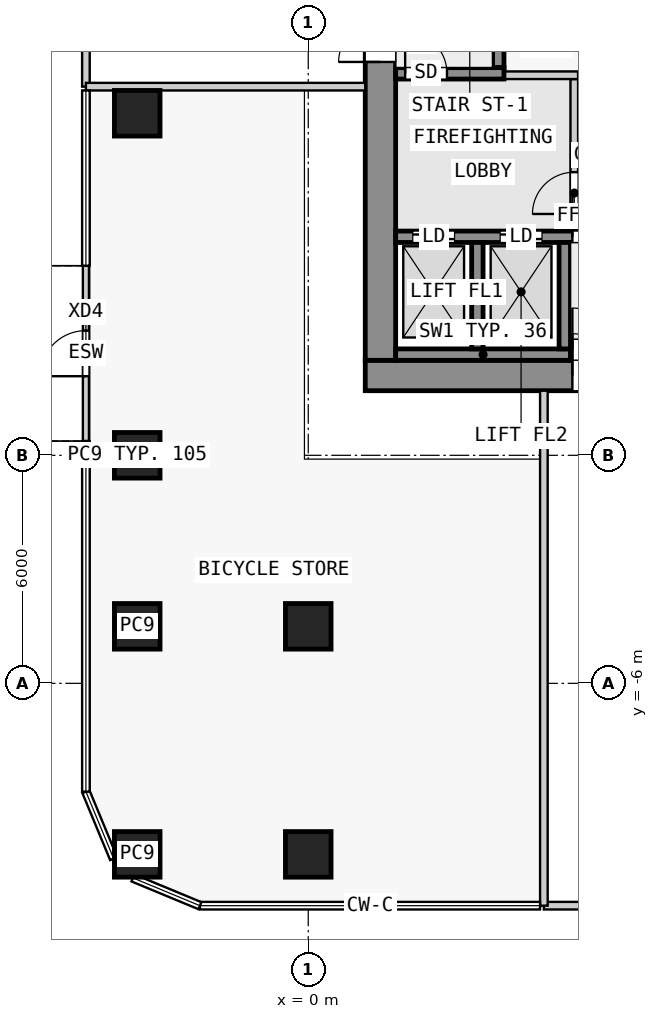
"""IFC4 building model, lengths in metres.
Left out: names, types, materials, properties, quantities, classifications, styles, units other than length and angle.
Written with IfcOpenShell. Run it as: python <this file> out.ifc"""

import sys

from ifc_helpers import new_model, si_unit, direction, frame, frame_2d, origin, origin_2d, place, context, subcontext, project, spatial, rectangle, extrude, element, fill, save


model = new_model("IFC4")
c1 = context("Model", 3, precision=1e-05, world=origin(), true_north=direction((0.0, 1.0)))
c2 = subcontext(c1, "Body", "Model", "MODEL_VIEW")
j1 = project(units=[si_unit("LENGTHUNIT", "METRE"), si_unit("PLANEANGLEUNIT", "RADIAN")], contexts=[c1])
p1 = place(None, origin())
s1 = spatial("IfcSite", under=j1, at=p1, CompositionType="ELEMENT")
p2 = place(p1, origin())
s2 = spatial("IfcBuilding", under=s1, at=p2, CompositionType="ELEMENT")
p3 = place(p2, origin())
s3 = spatial("IfcBuildingStorey", under=s2, at=p3, CompositionType="ELEMENT", Elevation=0.0)
for number, where, z_axis, x_axis in (
    (1, (-4.5, -10.5, 0.0), (0.0, 0.0, 1.0), (1.0, 0.0, 0.0)),
    (2, (-4.5, -4.5, 0.0), (0.0, 0.0, 1.0), (1.0, 0.0, 0.0)),
    (3, (-4.5, 0.0, 0.0), (0.0, 0.0, 1.0), (1.0, 0.0, 0.0)),
    (4, (-4.5, 9.0, 0.0), (0.0, 0.0, 1.0), (1.0, 0.0, 0.0)),
    (5, (0.0, -10.5, 0.0), (0.0, 0.0, 1.0), (1.0, 0.0, 0.0)),
    (6, (0.0, -4.5, 0.0), (0.0, 0.0, 1.0), (1.0, 0.0, 0.0)),
):
    element("IfcColumn", number, at=place(p3, frame(where, z_axis=z_axis, x_axis=x_axis)), inside=s3, PredefinedType="COLUMN", context=c2, shape_type="SweptSolid", body=[
        extrude(rectangle(XDim=1.2, YDim=1.2, at=origin_2d()), origin(), (0.0, 0.0, 1.0), 8.0),
    ])
p4 = place(p3, frame((1.5, 2.1, 0.0), z_axis=(0.0, 0.0, 1.0), x_axis=(1.0, 0.0, 0.0)))
e7 = element("IfcWall", 7, at=p4, inside=s3, PredefinedType="SHEAR", context=c2, shape_type="SweptSolid", body=[
    extrude(rectangle(XDim=21.0, YDim=0.8, at=frame_2d((10.5, 0.0))), origin(), (0.0, 0.0, 1.0), 7.65),
])
p5 = place(p4, frame((5.45, 0.0, 0.0)))
e8 = element("IfcOpeningElement", 8, at=p5, cuts=e7, PredefinedType="OPENING", context=c2, shape_type="SweptSolid", body=[
    extrude(rectangle(XDim=1.1, YDim=2.1, at=frame_2d((0.55, 1.05))), frame((0.0, 0.41, 0.0), z_axis=(0.0, -1.0, 0.0), x_axis=(1.0, 0.0, 0.0)), (0.0, 0.0, 1.0), 0.82),
])
p6 = place(p3, frame((1.9, 2.5, 0.0), z_axis=(0.0, 0.0, 1.0), x_axis=(0.0, 1.0, 0.0)))
e9 = element("IfcWall", 9, at=p6, inside=s3, PredefinedType="SHEAR", context=c2, shape_type="SweptSolid", body=[
    extrude(rectangle(XDim=14.7, YDim=0.8, at=frame_2d((7.35, 0.0))), origin(), (0.0, 0.0, 1.0), 7.65),
])
p7 = place(p6, frame((7.85, 0.0, 0.0)))
e10 = element("IfcOpeningElement", 10, at=p7, cuts=e9, PredefinedType="OPENING", context=c2, shape_type="SweptSolid", body=[
    extrude(rectangle(XDim=1.1, YDim=2.1, at=frame_2d((0.55, 1.05))), frame((0.0, 0.41, 0.0), z_axis=(0.0, -1.0, 0.0), x_axis=(1.0, 0.0, 0.0)), (0.0, 0.0, 1.0), 0.82),
])
p8 = place(p3, frame((2.3, 2.65, 0.0), z_axis=(0.0, 0.0, 1.0), x_axis=(1.0, 0.0, 0.0)))
e11 = element("IfcWall", 11, at=p8, inside=s3, PredefinedType="SHEAR", context=c2, shape_type="SweptSolid", body=[
    extrude(rectangle(XDim=4.6, YDim=0.3, at=frame_2d((2.3, 0.0))), origin(), (0.0, 0.0, 1.0), 7.65),
])
p9 = place(p3, frame((6.9, 2.775, 0.0), z_axis=(0.0, 0.0, 1.0), x_axis=(1.0, 0.0, 0.0)))
e12 = element("IfcWall", 12, at=p9, inside=s3, PredefinedType="SHEAR", context=c2, shape_type="SweptSolid", body=[
    extrude(rectangle(XDim=6.4, YDim=0.55, at=frame_2d((3.2, 0.0))), origin(), (0.0, 0.0, 1.0), 7.65),
])
p10 = place(p9, frame((0.05, 0.0, 0.0)))
e13 = element("IfcOpeningElement", 13, at=p10, cuts=e12, PredefinedType="OPENING", context=c2, shape_type="SweptSolid", body=[
    extrude(rectangle(XDim=1.1, YDim=2.1, at=frame_2d((0.55, 1.05))), frame((0.0, 0.285, 0.0), z_axis=(0.0, -1.0, 0.0), x_axis=(1.0, 0.0, 0.0)), (0.0, 0.0, 1.0), 0.57),
])
for number, where, z_axis, x_axis in (
    (14, (4.45, 2.8, 0.0), (0.0, 0.0, 1.0), (0.0, 1.0, 0.0)),
    (15, (6.75, 2.8, 0.0), (0.0, 0.0, 1.0), (0.0, 1.0, 0.0)),
):
    element("IfcWall", number, at=place(p3, frame(where, z_axis=z_axis, x_axis=x_axis)), inside=s3, PredefinedType="SHEAR", context=c2, shape_type="SweptSolid", body=[
        extrude(rectangle(XDim=2.8, YDim=0.3, at=frame_2d((1.4, 0.0))), origin(), (0.0, 0.0, 1.0), 7.65),
    ])
p11 = place(p3, frame((2.3, 5.75, 0.0), z_axis=(0.0, 0.0, 1.0), x_axis=(1.0, 0.0, 0.0)))
e16 = element("IfcWall", 16, at=p11, inside=s3, PredefinedType="SHEAR", context=c2, shape_type="SweptSolid", body=[
    extrude(rectangle(XDim=18.8, YDim=0.3, at=frame_2d((9.4, 0.0))), origin(), (0.0, 0.0, 1.0), 7.65),
])
p12 = place(p11, frame((4.65, 0.0, 0.0)))
e17 = element("IfcOpeningElement", 17, at=p12, cuts=e16, PredefinedType="OPENING", context=c2, shape_type="SweptSolid", body=[
    extrude(rectangle(XDim=1.1, YDim=2.1, at=frame_2d((0.55, 1.05))), frame((0.0, 0.16, 0.0), z_axis=(0.0, -1.0, 0.0), x_axis=(1.0, 0.0, 0.0)), (0.0, 0.0, 1.0), 0.32),
])
p13 = place(p11, frame((0.45, 0.0, 0.0)))
e18 = element("IfcOpeningElement", 18, at=p13, cuts=e16, PredefinedType="OPENING", context=c2, shape_type="SweptSolid", body=[
    extrude(rectangle(XDim=1.1, YDim=2.1, at=frame_2d((0.55, 1.05))), frame((0.0, 0.16, 0.0), z_axis=(0.0, -1.0, 0.0), x_axis=(1.0, 0.0, 0.0)), (0.0, 0.0, 1.0), 0.32),
])
p14 = place(p11, frame((2.75, 0.0, 0.0)))
e19 = element("IfcOpeningElement", 19, at=p14, cuts=e16, PredefinedType="OPENING", context=c2, shape_type="SweptSolid", body=[
    extrude(rectangle(XDim=1.1, YDim=2.1, at=frame_2d((0.55, 1.05))), frame((0.0, 0.16, 0.0), z_axis=(0.0, -1.0, 0.0), x_axis=(1.0, 0.0, 0.0)), (0.0, 0.0, 1.0), 0.32),
])
p15 = place(p11, frame((11.85, 0.0, 0.0)))
e20 = element("IfcOpeningElement", 20, at=p15, cuts=e16, PredefinedType="OPENING", context=c2, shape_type="SweptSolid", body=[
    extrude(rectangle(XDim=1.1, YDim=2.1, at=frame_2d((0.55, 1.05))), frame((0.0, 0.16, 0.0), z_axis=(0.0, -1.0, 0.0), x_axis=(1.0, 0.0, 0.0)), (0.0, 0.0, 1.0), 0.32),
])
p16 = place(p11, frame((14.35, 0.0, 0.0)))
e21 = element("IfcOpeningElement", 21, at=p16, cuts=e16, PredefinedType="OPENING", context=c2, shape_type="SweptSolid", body=[
    extrude(rectangle(XDim=1.1, YDim=2.1, at=frame_2d((0.55, 1.05))), frame((0.0, 0.16, 0.0), z_axis=(0.0, -1.0, 0.0), x_axis=(1.0, 0.0, 0.0)), (0.0, 0.0, 1.0), 0.32),
])
p17 = place(p11, frame((16.85, 0.0, 0.0)))
e22 = element("IfcOpeningElement", 22, at=p17, cuts=e16, PredefinedType="OPENING", context=c2, shape_type="SweptSolid", body=[
    extrude(rectangle(XDim=1.1, YDim=2.1, at=frame_2d((0.55, 1.05))), frame((0.0, 0.16, 0.0), z_axis=(0.0, -1.0, 0.0), x_axis=(1.0, 0.0, 0.0)), (0.0, 0.0, 1.0), 0.32),
])
p18 = place(p3, frame((2.3, 10.05, 0.0), z_axis=(0.0, 0.0, 1.0), x_axis=(1.0, 0.0, 0.0)))
e23 = element("IfcWall", 23, at=p18, inside=s3, PredefinedType="SHEAR", context=c2, shape_type="SweptSolid", body=[
    extrude(rectangle(XDim=2.85, YDim=0.3, at=frame_2d((1.425, 0.0))), origin(), (0.0, 0.0, 1.0), 7.65),
])
p19 = place(p18, frame((0.25, 0.0, 0.0)))
e24 = element("IfcOpeningElement", 24, at=p19, cuts=e23, PredefinedType="OPENING", context=c2, shape_type="SweptSolid", body=[
    extrude(rectangle(XDim=1.1, YDim=2.1, at=frame_2d((0.55, 1.05))), frame((0.0, 0.16, 0.0), z_axis=(0.0, -1.0, 0.0), x_axis=(1.0, 0.0, 0.0)), (0.0, 0.0, 1.0), 0.32),
])
p20 = place(p3, frame((5.0, 10.2, 0.0), z_axis=(0.0, 0.0, 1.0), x_axis=(0.0, 1.0, 0.0)))
e25 = element("IfcWall", 25, at=p20, inside=s3, PredefinedType="SHEAR", context=c2, shape_type="SweptSolid", body=[
    extrude(rectangle(XDim=6.4, YDim=0.3, at=frame_2d((3.2, 0.0))), origin(), (0.0, 0.0, 1.0), 7.65),
])
p21 = place(p3, frame((-5.85, 0.375, 0.0), z_axis=(0.0, 0.0, 1.0), x_axis=(0.0, 1.0, 0.0)))
e26 = element("IfcWall", 26, at=p21, inside=s3, PredefinedType="STANDARD", context=c2, shape_type="SweptSolid", body=[
    extrude(rectangle(XDim=4.613, YDim=0.16, at=frame_2d((2.306, 0.0))), origin(), (0.0, 0.0, 1.0), 7.65),
])
p22 = place(p21, frame((1.706, 0.0, 0.0)))
e27 = element("IfcOpeningElement", 27, at=p22, cuts=e26, PredefinedType="OPENING", context=c2, shape_type="SweptSolid", body=[
    extrude(rectangle(XDim=1.2, YDim=2.4, at=frame_2d((0.6, 1.2))), frame((0.0, 0.09, 0.0), z_axis=(0.0, -1.0, 0.0), x_axis=(1.0, 0.0, 0.0)), (0.0, 0.0, 1.0), 0.18),
])
p23 = place(p3, frame((7.0, 5.9, 0.0), z_axis=(0.0, 0.0, 1.0), x_axis=(0.0, 1.0, 0.0)))
e28 = element("IfcWall", 28, at=p23, inside=s3, PredefinedType="PARTITIONING", context=c2, shape_type="SweptSolid", body=[
    extrude(rectangle(XDim=4.0, YDim=0.2, at=frame_2d((2.0, 0.0))), origin(), (0.0, 0.0, 1.0), 7.65),
])
p24 = place(p23, frame((0.45, 0.0, 0.0)))
e29 = element("IfcOpeningElement", 29, at=p24, cuts=e28, PredefinedType="OPENING", context=c2, shape_type="SweptSolid", body=[
    extrude(rectangle(XDim=1.1, YDim=2.1, at=frame_2d((0.55, 1.05))), frame((0.0, 0.11, 0.0), z_axis=(0.0, -1.0, 0.0), x_axis=(1.0, 0.0, 0.0)), (0.0, 0.0, 1.0), 0.22),
])
p25 = place(p3, frame((5.15, 10.0, 0.0), z_axis=(0.0, 0.0, 1.0), x_axis=(1.0, 0.0, 0.0)))
e30 = element("IfcWall", 30, at=p25, inside=s3, PredefinedType="PARTITIONING", context=c2, shape_type="SweptSolid", body=[
    extrude(rectangle(XDim=1.95, YDim=0.2, at=frame_2d((0.975, 0.0))), origin(), (0.0, 0.0, 1.0), 7.65),
])
p26 = place(p3, frame((-5.85, 9.7, 0.0), z_axis=(0.0, 0.0, 1.0), x_axis=(1.0, 0.0, 0.0)))
e31 = element("IfcWall", 31, at=p26, inside=s3, PredefinedType="PARTITIONING", context=c2, shape_type="SweptSolid", body=[
    extrude(rectangle(XDim=7.35, YDim=0.2, at=frame_2d((3.675, 0.0))), origin(), (0.0, 0.0, 1.0), 7.65),
])
p27 = place(p3, frame((-5.85, 9.7, 0.0), z_axis=(0.0, 0.0, 1.0), x_axis=(0.0, 1.0, 0.0)))
e32 = element("IfcWall", 32, at=p27, inside=s3, PredefinedType="PARTITIONING", context=c2, shape_type="SweptSolid", body=[
    extrude(rectangle(XDim=2.4, YDim=0.2, at=frame_2d((1.2, 0.0))), origin(), (0.0, 0.0, 1.0), 7.65),
])
p28 = place(p3, frame((6.2, -11.85, 0.0), z_axis=(0.0, 0.0, 1.0), x_axis=(0.0, 1.0, 0.0)))
e33 = element("IfcWall", 33, at=p28, inside=s3, PredefinedType="PARTITIONING", context=c2, shape_type="SweptSolid", body=[
    extrude(rectangle(XDim=13.55, YDim=0.2, at=frame_2d((6.775, 0.0))), origin(), (0.0, 0.0, 1.0), 7.65),
])
p29 = place(p3, frame((6.2, -11.85, 0.0), z_axis=(0.0, 0.0, 1.0), x_axis=(1.0, 0.0, 0.0)))
e34 = element("IfcWall", 34, at=p29, inside=s3, PredefinedType="PARTITIONING", context=c2, shape_type="SweptSolid", body=[
    extrude(rectangle(XDim=2.0, YDim=0.2, at=frame_2d((1.0, 0.0))), origin(), (0.0, 0.0, 1.0), 7.65),
])
p30 = place(p22, origin())
e35 = element("IfcDoor", 35, at=p30, inside=s3, OperationType="SINGLE_SWING_LEFT", PredefinedType="DOOR", context=c2, shape_type="SweptSolid", body=[
    extrude(rectangle(XDim=1.2, YDim=2.4, at=frame_2d((0.6, 1.2))), frame((0.0, 0.025, 0.0), z_axis=(0.0, -1.0, 0.0), x_axis=(1.0, 0.0, 0.0)), (0.0, 0.0, 1.0), 0.05),
])
fill(e27, e35)
p31 = place(p24, origin())
e36 = element("IfcDoor", 36, at=p31, inside=s3, OperationType="SINGLE_SWING_LEFT", PredefinedType="DOOR", context=c2, shape_type="SweptSolid", body=[
    extrude(rectangle(XDim=1.1, YDim=2.1, at=frame_2d((0.55, 1.05))), frame((0.0, 0.025, 0.0), z_axis=(0.0, -1.0, 0.0), x_axis=(1.0, 0.0, 0.0)), (0.0, 0.0, 1.0), 0.05),
])
fill(e29, e36)
p32 = place(p19, origin())
e37 = element("IfcDoor", 37, at=p32, inside=s3, OperationType="SINGLE_SWING_RIGHT", PredefinedType="DOOR", context=c2, shape_type="SweptSolid", body=[
    extrude(rectangle(XDim=1.1, YDim=2.1, at=frame_2d((0.55, 1.05))), frame((0.0, 0.025, 0.0), z_axis=(0.0, -1.0, 0.0), x_axis=(1.0, 0.0, 0.0)), (0.0, 0.0, 1.0), 0.05),
])
fill(e24, e37)
p33 = place(p12, origin())
e38 = element("IfcDoor", 38, at=p33, inside=s3, OperationType="SINGLE_SWING_LEFT", PredefinedType="DOOR", context=c2, shape_type="SweptSolid", body=[
    extrude(rectangle(XDim=1.1, YDim=2.1, at=frame_2d((0.55, 1.05))), frame((0.0, 0.025, 0.0), z_axis=(0.0, -1.0, 0.0), x_axis=(1.0, 0.0, 0.0)), (0.0, 0.0, 1.0), 0.05),
])
fill(e17, e38)
p34 = place(p13, origin())
e39 = element("IfcDoor", 39, at=p34, inside=s3, OperationType="DOUBLE_DOOR_SLIDING", PredefinedType="DOOR", context=c2, shape_type="SweptSolid", body=[
    extrude(rectangle(XDim=1.1, YDim=2.1, at=frame_2d((0.55, 1.05))), frame((0.0, 0.025, 0.0), z_axis=(0.0, -1.0, 0.0), x_axis=(1.0, 0.0, 0.0)), (0.0, 0.0, 1.0), 0.05),
])
fill(e18, e39)
p35 = place(p14, origin())
e40 = element("IfcDoor", 40, at=p35, inside=s3, OperationType="DOUBLE_DOOR_SLIDING", PredefinedType="DOOR", context=c2, shape_type="SweptSolid", body=[
    extrude(rectangle(XDim=1.1, YDim=2.1, at=frame_2d((0.55, 1.05))), frame((0.0, 0.025, 0.0), z_axis=(0.0, -1.0, 0.0), x_axis=(1.0, 0.0, 0.0)), (0.0, 0.0, 1.0), 0.05),
])
fill(e19, e40)
p36 = place(p7, origin())
e41 = element("IfcDoor", 41, at=p36, inside=s3, OperationType="SINGLE_SWING_LEFT", PredefinedType="DOOR", context=c2, shape_type="SweptSolid", body=[
    extrude(rectangle(XDim=1.1, YDim=2.1, at=frame_2d((0.55, 1.05))), frame((0.0, 0.025, 0.0), z_axis=(0.0, -1.0, 0.0), x_axis=(1.0, 0.0, 0.0)), (0.0, 0.0, 1.0), 0.05),
])
fill(e10, e41)
p37 = place(p10, origin())
e42 = element("IfcDoor", 42, at=p37, inside=s3, OperationType="SINGLE_SWING_LEFT", PredefinedType="DOOR", context=c2, shape_type="SweptSolid", body=[
    extrude(rectangle(XDim=1.1, YDim=2.1, at=frame_2d((0.55, 1.05))), frame((0.0, 0.025, 0.0), z_axis=(0.0, -1.0, 0.0), x_axis=(1.0, 0.0, 0.0)), (0.0, 0.0, 1.0), 0.05),
])
fill(e13, e42)
p38 = place(p5, origin())
e43 = element("IfcDoor", 43, at=p38, inside=s3, OperationType="SINGLE_SWING_LEFT", PredefinedType="DOOR", context=c2, shape_type="SweptSolid", body=[
    extrude(rectangle(XDim=1.1, YDim=2.1, at=frame_2d((0.55, 1.05))), frame((0.0, 0.025, 0.0), z_axis=(0.0, -1.0, 0.0), x_axis=(1.0, 0.0, 0.0)), (0.0, 0.0, 1.0), 0.05),
])
fill(e8, e43)
save(model, sys.argv[1])
